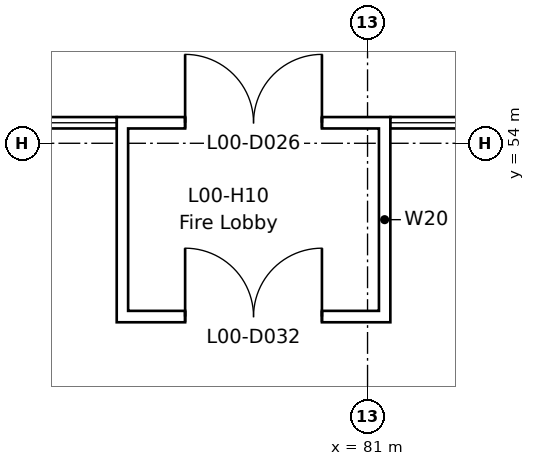
"""IFC4 building model, lengths in metres.
Left out: names, types, materials, properties, quantities, classifications, styles, units other than length and angle.
Written with IfcOpenShell. Run it as: python <this file> out.ifc"""

import sys

from ifc_helpers import new_model, si_unit, direction, frame, frame_2d, origin, place, context, subcontext, project, spatial, rectangle, extrude, element, fill, save


model = new_model("IFC4")
c1 = context("Model", 3, precision=1e-05, world=origin(), true_north=direction((0.0, 1.0)))
c2 = subcontext(c1, "Body", "Model", "MODEL_VIEW")
j1 = project(units=[si_unit("LENGTHUNIT", "METRE"), si_unit("PLANEANGLEUNIT", "RADIAN")], contexts=[c1])
p1 = place(None, origin())
s1 = spatial("IfcSite", under=j1, at=p1, CompositionType="ELEMENT")
p2 = place(p1, origin())
s2 = spatial("IfcBuilding", under=s1, at=p2, CompositionType="ELEMENT")
p3 = place(p2, origin())
s3 = spatial("IfcBuildingStorey", under=s2, at=p3, CompositionType="ELEMENT", Elevation=0.0)
p4 = place(p3, frame((77.7, 54.27, 0.0), z_axis=(0.0, 0.0, 1.0), x_axis=(1.0, 0.0, 0.0)))
e1 = element("IfcWall", 1, at=p4, inside=s3, PredefinedType="STANDARD", context=c2, shape_type="SweptSolid", body=[
    extrude(rectangle(XDim=3.6, YDim=0.15, at=frame_2d((1.8, 0.0))), origin(), (0.0, 0.0, 1.0), 4.8),
])
p5 = place(p4, frame((0.9, 0.0, 0.0)))
e2 = element("IfcOpeningElement", 2, at=p5, cuts=e1, PredefinedType="OPENING", context=c2, shape_type="SweptSolid", body=[
    extrude(rectangle(XDim=1.8, YDim=2.4, at=frame_2d((0.9, 1.2))), frame((0.0, 0.085, 0.0), z_axis=(0.0, -1.0, 0.0), x_axis=(1.0, 0.0, 0.0)), (0.0, 0.0, 1.0), 0.17),
])
for number, where, z_axis, x_axis in (
    (3, (77.775, 51.795, 0.0), (0.0, 0.0, 1.0), (0.0, 1.0, 0.0)),
    (4, (81.225, 51.795, 0.0), (0.0, 0.0, 1.0), (0.0, 1.0, 0.0)),
):
    element("IfcWall", number, at=place(p3, frame(where, z_axis=z_axis, x_axis=x_axis)), inside=s3, PredefinedType="STANDARD", context=c2, shape_type="SweptSolid", body=[
        extrude(rectangle(XDim=2.4, YDim=0.15, at=frame_2d((1.2, 0.0))), origin(), (0.0, 0.0, 1.0), 3.0),
    ])
p6 = place(p3, frame((77.7, 51.72, 0.0), z_axis=(0.0, 0.0, 1.0), x_axis=(1.0, 0.0, 0.0)))
e5 = element("IfcWall", 5, at=p6, inside=s3, PredefinedType="STANDARD", context=c2, shape_type="SweptSolid", body=[
    extrude(rectangle(XDim=3.6, YDim=0.15, at=frame_2d((1.8, 0.0))), origin(), (0.0, 0.0, 1.0), 3.0),
])
p7 = place(p6, frame((0.9, 0.0, 0.0)))
e6 = element("IfcOpeningElement", 6, at=p7, cuts=e5, PredefinedType="OPENING", context=c2, shape_type="SweptSolid", body=[
    extrude(rectangle(XDim=1.8, YDim=2.4, at=frame_2d((0.9, 1.2))), frame((0.0, 0.085, 0.0), z_axis=(0.0, -1.0, 0.0), x_axis=(1.0, 0.0, 0.0)), (0.0, 0.0, 1.0), 0.17),
])
p8 = place(p5, origin())
e7 = element("IfcDoor", 7, at=p8, inside=s3, OperationType="DOUBLE_DOOR_SINGLE_SWING", PredefinedType="DOOR", context=c2, shape_type="SweptSolid", body=[
    extrude(rectangle(XDim=1.8, YDim=2.4, at=frame_2d((0.9, 1.2))), frame((0.0, 0.025, 0.0), z_axis=(0.0, -1.0, 0.0), x_axis=(1.0, 0.0, 0.0)), (0.0, 0.0, 1.0), 0.05),
])
fill(e2, e7)
p9 = place(p7, origin())
e8 = element("IfcDoor", 8, at=p9, inside=s3, OperationType="DOUBLE_DOOR_SINGLE_SWING", PredefinedType="DOOR", context=c2, shape_type="SweptSolid", body=[
    extrude(rectangle(XDim=1.8, YDim=2.4, at=frame_2d((0.9, 1.2))), frame((0.0, 0.025, 0.0), z_axis=(0.0, -1.0, 0.0), x_axis=(1.0, 0.0, 0.0)), (0.0, 0.0, 1.0), 0.05),
])
fill(e6, e8)
save(model, sys.argv[1])
